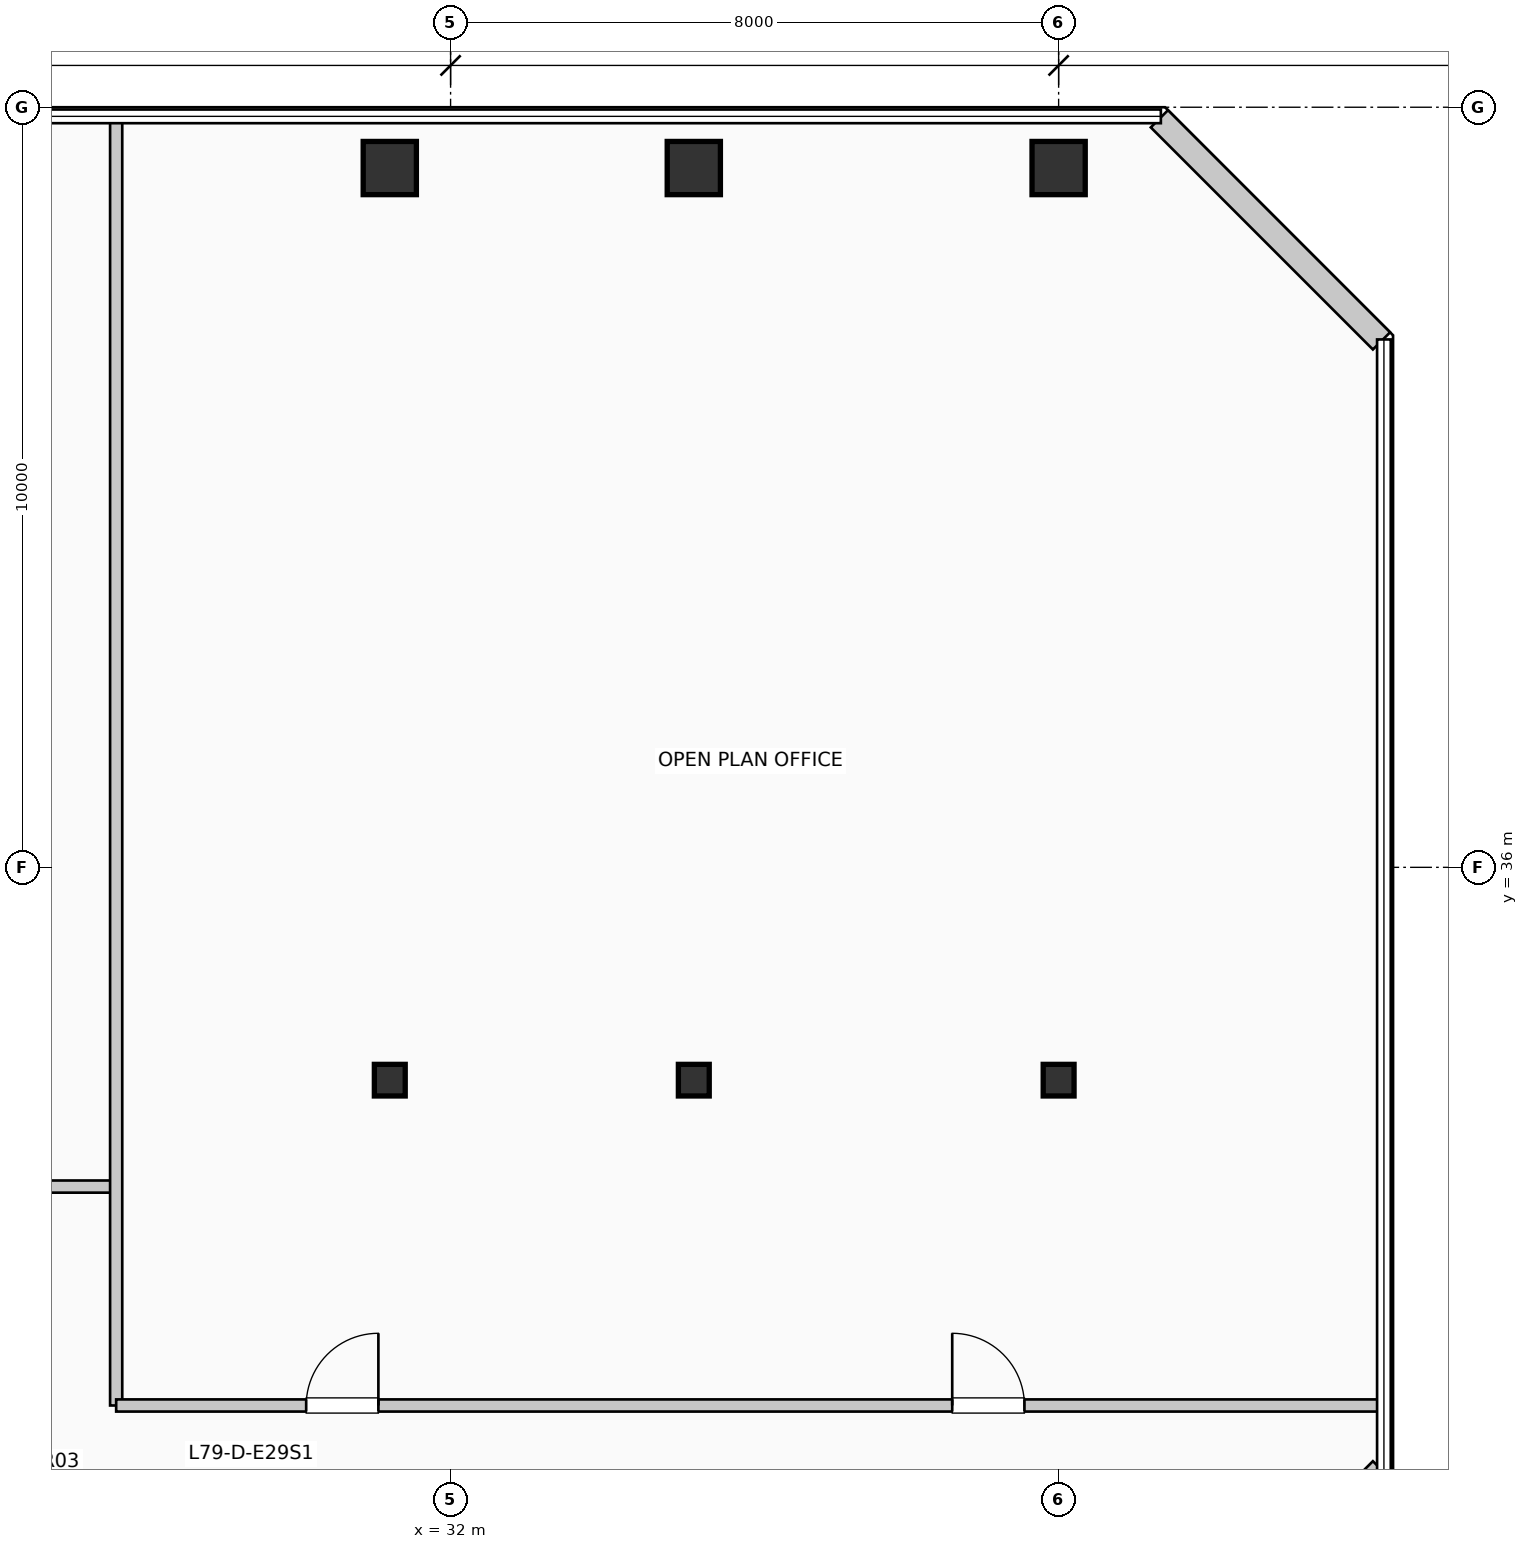
"""IFC4 building model, lengths in metres.
Left out: names, types, materials, properties, quantities, classifications, styles, units other than length and angle.
Written with IfcOpenShell. Run it as: python <this file> out.ifc"""

import sys

from ifc_helpers import new_model, si_unit, direction, frame, frame_2d, origin, origin_2d, place, context, subcontext, project, spatial, rectangle, i_section, extrude, element, fill, save


model = new_model("IFC4")
c1 = context("Model", 3, precision=1e-05, world=origin(), true_north=direction((0.0, 1.0)))
c2 = subcontext(c1, "Body", "Model", "MODEL_VIEW")
j1 = project(units=[si_unit("LENGTHUNIT", "METRE"), si_unit("PLANEANGLEUNIT", "RADIAN")], contexts=[c1])
p1 = place(None, origin())
s1 = spatial("IfcSite", under=j1, at=p1, CompositionType="ELEMENT")
p2 = place(p1, origin())
s2 = spatial("IfcBuilding", under=s1, at=p2, CompositionType="ELEMENT")
p3 = place(p2, frame((0.0, 0.0, 323.73)))
s3 = spatial("IfcBuildingStorey", under=s2, at=p3, CompositionType="ELEMENT", Elevation=323.73)
p4 = place(p3, frame((31.2, 33.2, 0.0), z_axis=(0.0, 0.0, 1.0), x_axis=(1.0, 0.0, 0.0)))
e1 = element("IfcColumn", 1, at=p4, inside=s3, PredefinedType="COLUMN", context=c2, shape_type="SweptSolid", body=[
    extrude(i_section(OverallWidth=0.406, OverallDepth=0.416, WebThickness=0.022, FlangeThickness=0.036, at=origin_2d()), origin(), (0.0, 0.0, 1.0), 3.96),
])
p5 = place(p3, frame((31.2, 45.2, 0.0), z_axis=(0.0, 0.0, 1.0), x_axis=(1.0, 0.0, 0.0)))
e2 = element("IfcColumn", 2, at=p5, inside=s3, PredefinedType="COLUMN", context=c2, shape_type="SweptSolid", body=[
    extrude(rectangle(XDim=0.7, YDim=0.7, at=origin_2d()), origin(), (0.0, 0.0, 1.0), 3.96),
])
p6 = place(p3, frame((35.2, 33.2, 0.0), z_axis=(0.0, 0.0, 1.0), x_axis=(1.0, 0.0, 0.0)))
e3 = element("IfcColumn", 3, at=p6, inside=s3, PredefinedType="COLUMN", context=c2, shape_type="SweptSolid", body=[
    extrude(i_section(OverallWidth=0.406, OverallDepth=0.416, WebThickness=0.022, FlangeThickness=0.036, at=origin_2d()), origin(), (0.0, 0.0, 1.0), 3.96),
])
p7 = place(p3, frame((35.2, 45.2, 0.0), z_axis=(0.0, 0.0, 1.0), x_axis=(1.0, 0.0, 0.0)))
e4 = element("IfcColumn", 4, at=p7, inside=s3, PredefinedType="COLUMN", context=c2, shape_type="SweptSolid", body=[
    extrude(rectangle(XDim=0.7, YDim=0.7, at=origin_2d()), origin(), (0.0, 0.0, 1.0), 3.96),
])
p8 = place(p3, frame((40.0, 33.2, 0.0), z_axis=(0.0, 0.0, 1.0), x_axis=(1.0, 0.0, 0.0)))
e5 = element("IfcColumn", 5, at=p8, inside=s3, PredefinedType="COLUMN", context=c2, shape_type="SweptSolid", body=[
    extrude(i_section(OverallWidth=0.406, OverallDepth=0.416, WebThickness=0.022, FlangeThickness=0.036, at=origin_2d()), origin(), (0.0, 0.0, 1.0), 3.96),
])
p9 = place(p3, frame((40.0, 45.2, 0.0), z_axis=(0.0, 0.0, 1.0), x_axis=(1.0, 0.0, 0.0)))
e6 = element("IfcColumn", 6, at=p9, inside=s3, PredefinedType="COLUMN", context=c2, shape_type="SweptSolid", body=[
    extrude(rectangle(XDim=0.7, YDim=0.7, at=origin_2d()), origin(), (0.0, 0.0, 1.0), 3.96),
])
for number, where, z_axis, x_axis in (
    (7, (41.326, 25.152, 0.0), (0.0, 0.0, 1.0), (0.707, 0.707, 0.0)),
    (8, (44.248, 42.926, 0.0), (0.0, 0.0, 1.0), (-0.707, 0.707, 0.0)),
):
    element("IfcWall", number, at=place(p3, frame(where, z_axis=z_axis, x_axis=x_axis)), inside=s3, PredefinedType="SOLIDWALL", context=c2, shape_type="SweptSolid", body=[
        extrude(rectangle(XDim=4.133, YDim=0.32, at=frame_2d((2.066, 0.0))), origin(), (0.0, 0.0, 1.0), 3.74),
    ])
p10 = place(p3, frame((23.6, 31.8, 0.0), z_axis=(0.0, 0.0, 1.0), x_axis=(1.0, 0.0, 0.0)))
e9 = element("IfcWall", 9, at=p10, inside=s3, PredefinedType="PARTITIONING", context=c2, shape_type="SweptSolid", body=[
    extrude(rectangle(XDim=4.0, YDim=0.16, at=frame_2d((2.0, 0.0))), origin(), (0.0, 0.0, 1.0), 3.74),
])
p11 = place(p10, frame((1.2, 0.0, 0.0)))
e10 = element("IfcOpeningElement", 10, at=p11, cuts=e9, PredefinedType="OPENING", context=c2, shape_type="SweptSolid", body=[
    extrude(rectangle(XDim=0.95, YDim=2.15, at=frame_2d((0.475, 1.075))), frame((0.0, 0.09, 0.0), z_axis=(0.0, -1.0, 0.0), x_axis=(1.0, 0.0, 0.0)), (0.0, 0.0, 1.0), 0.18),
])
p12 = place(p3, frame((27.6, 28.92, 0.0), z_axis=(0.0, 0.0, 1.0), x_axis=(0.0, 1.0, 0.0)))
e11 = element("IfcWall", 11, at=p12, inside=s3, PredefinedType="PARTITIONING", context=c2, shape_type="SweptSolid", body=[
    extrude(rectangle(XDim=16.89, YDim=0.16, at=frame_2d((8.445, 0.0))), origin(), (0.0, 0.0, 1.0), 3.74),
])
p13 = place(p3, frame((27.6, 28.92, 0.0), z_axis=(0.0, 0.0, 1.0), x_axis=(1.0, 0.0, 0.0)))
e12 = element("IfcWall", 12, at=p13, inside=s3, PredefinedType="PARTITIONING", context=c2, shape_type="SweptSolid", body=[
    extrude(rectangle(XDim=16.61, YDim=0.16, at=frame_2d((8.305, 0.0))), origin(), (0.0, 0.0, 1.0), 3.74),
])
p14 = place(p13, frame((2.5, 0.0, 0.0)))
e13 = element("IfcOpeningElement", 13, at=p14, cuts=e12, PredefinedType="OPENING", context=c2, shape_type="SweptSolid", body=[
    extrude(rectangle(XDim=0.95, YDim=2.15, at=frame_2d((0.475, 1.075))), frame((0.0, 0.09, 0.0), z_axis=(0.0, -1.0, 0.0), x_axis=(1.0, 0.0, 0.0)), (0.0, 0.0, 1.0), 0.18),
])
p15 = place(p13, frame((11.0, 0.0, 0.0)))
e14 = element("IfcOpeningElement", 14, at=p15, cuts=e12, PredefinedType="OPENING", context=c2, shape_type="SweptSolid", body=[
    extrude(rectangle(XDim=0.95, YDim=2.15, at=frame_2d((0.475, 1.075))), frame((0.0, 0.09, 0.0), z_axis=(0.0, -1.0, 0.0), x_axis=(1.0, 0.0, 0.0)), (0.0, 0.0, 1.0), 0.18),
])
p16 = place(p14, origin())
e15 = element("IfcDoor", 15, at=p16, inside=s3, OperationType="SINGLE_SWING_RIGHT", PredefinedType="DOOR", context=c2, shape_type="SweptSolid", body=[
    extrude(rectangle(XDim=0.95, YDim=2.15, at=frame_2d((0.475, 1.075))), frame((0.0, 0.025, 0.0), z_axis=(0.0, -1.0, 0.0), x_axis=(1.0, 0.0, 0.0)), (0.0, 0.0, 1.0), 0.05),
])
fill(e13, e15)
p17 = place(p15, origin())
e16 = element("IfcDoor", 16, at=p17, inside=s3, OperationType="SINGLE_SWING_LEFT", PredefinedType="DOOR", context=c2, shape_type="SweptSolid", body=[
    extrude(rectangle(XDim=0.95, YDim=2.15, at=frame_2d((0.475, 1.075))), frame((0.0, 0.025, 0.0), z_axis=(0.0, -1.0, 0.0), x_axis=(1.0, 0.0, 0.0)), (0.0, 0.0, 1.0), 0.05),
])
fill(e14, e16)
save(model, sys.argv[1])
